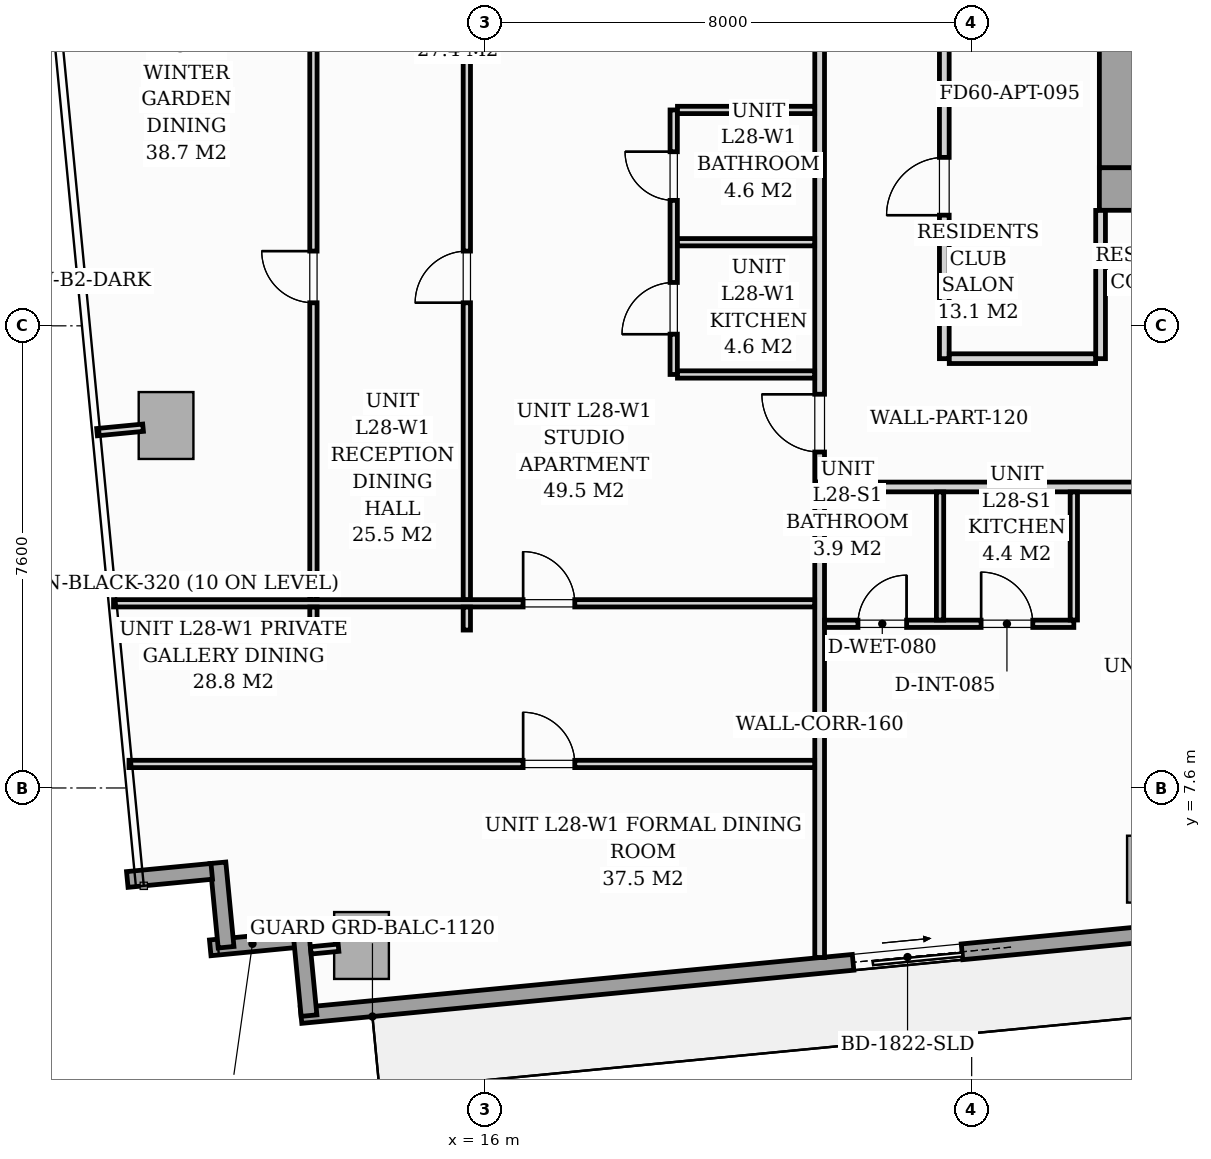
"""IFC4 building model, lengths in metres.
Left out: names, types, materials, properties, quantities, classifications, styles, units other than length and angle.
Written with IfcOpenShell. Run it as: python <this file> out.ifc"""

import sys

from ifc_helpers import new_model, si_unit, direction, frame, frame_2d, origin, origin_2d, place, context, subcontext, project, spatial, rectangle, i_section, extrude, source, transform, mapped, element, fill, save


model = new_model("IFC4")
c1 = context("Model", 3, precision=1e-05, world=origin(), true_north=direction((0.0, 1.0)))
c2 = subcontext(c1, "Body", "Model", "MODEL_VIEW")
j1 = project(units=[si_unit("LENGTHUNIT", "METRE"), si_unit("PLANEANGLEUNIT", "RADIAN")], contexts=[c1])
p1 = place(None, origin())
s1 = spatial("IfcSite", under=j1, at=p1, CompositionType="ELEMENT")
p2 = place(p1, origin())
s2 = spatial("IfcBuilding", under=s1, at=p2, CompositionType="ELEMENT")
p3 = place(p2, frame((0.0, 0.0, 100.2)))
s3 = spatial("IfcBuildingStorey", under=s2, at=p3, CompositionType="ELEMENT", Elevation=100.2)
m1 = source(origin(), c2, "Body", "SweptSolid", [
    extrude(i_section(OverallWidth=0.427, OverallDepth=0.483, WebThickness=0.051, FlangeThickness=0.082, FilletRadius=0.018, at=origin_2d()), origin(), (0.0, 0.0, 1.0), 3.196),
])
p4 = place(p3, frame((26.4, 17.4, 0.002), z_axis=(0.0, 0.0, 1.0), x_axis=(1.0, 0.0, 0.0)))
e1 = element("IfcColumn", 1, at=p4, inside=s3, PredefinedType="PILASTER", context=c2, shape_type="MappedRepresentation", body=[
    mapped(m1, transform((0.0, 0.0, 0.0), scale=1.0)),
])
m2 = source(origin(), c2, "Body", "SweptSolid", [
    extrude(rectangle(XDim=0.9, YDim=1.1, at=origin_2d()), origin(), (0.0, 0.0, 1.0), 3.196),
])
for number, where, z_axis, x_axis in (
    (2, (13.966, 5.01, 0.002), (0.0, 0.0, 1.0), (0.995, 0.096, 0.0)),
    (3, (27.006, 6.265, 0.002), (0.0, 0.0, 1.0), (0.995, 0.096, 0.0)),
    (4, (10.752, 13.561, 0.002), (0.0, 0.0, 1.0), (0.995, 0.096, 0.0)),
):
    element("IfcColumn", number, at=place(p3, frame(where, z_axis=z_axis, x_axis=x_axis)), inside=s3, PredefinedType="COLUMN", context=c2, shape_type="MappedRepresentation", body=[
        mapped(m2, transform((0.0, 0.0, 0.0), scale=1.0)),
    ])
for number, where, z_axis, x_axis in (
    (5, (12.867, 5.104, 0.0), (0.0, 0.0, 1.0), (-0.995, -0.096, 0.0)),
    (6, (11.739, 4.981, 0.0), (0.0, 0.0, 1.0), (-0.096, 0.995, 0.0)),
):
    element("IfcWall", number, at=place(p3, frame(where, z_axis=z_axis, x_axis=x_axis)), inside=s3, PredefinedType="STANDARD", context=c2, shape_type="SweptSolid", body=[
        extrude(rectangle(XDim=1.395, YDim=0.26, at=frame_2d((0.697, 0.0))), origin(), (0.0, 0.0, 1.0), 2.94),
    ])
p5 = place(p3, frame((11.503, 6.229, 0.0), z_axis=(0.0, 0.0, 1.0), x_axis=(-0.995391056452, -0.09589913835, 0.0)))
e7 = element("IfcWall", 7, at=p5, inside=s3, PredefinedType="STANDARD", context=c2, shape_type="SweptSolid", body=[
    extrude(rectangle(XDim=1.395, YDim=0.26, at=frame_2d((0.698, 0.0))), origin(), (0.0, 0.0, 1.0), 2.94),
])
p6 = place(p3, frame((31.994, 5.69, 0.0), z_axis=(0.0, 0.0, 1.0), x_axis=(-0.995396521236, -0.095842399342, 0.0)))
e8 = element("IfcWall", 8, at=p6, inside=s3, PredefinedType="STANDARD", context=c2, shape_type="SweptSolid", body=[
    extrude(rectangle(XDim=19.11, YDim=0.26, at=frame_2d((9.555, 0.0))), origin(), (0.0, 0.0, 1.0), 2.94),
])
p7 = place(p6, frame((8.19, 0.0, 0.0)))
e9 = element("IfcOpeningElement", 9, at=p7, cuts=e8, PredefinedType="OPENING", context=c2, shape_type="SweptSolid", body=[
    extrude(rectangle(XDim=1.8, YDim=2.06, at=frame_2d((0.9, 1.03))), frame((0.0, 0.14, 0.0), z_axis=(0.0, -1.0, 0.0), x_axis=(1.0, 0.0, 0.0)), (0.0, 0.0, 1.0), 0.28),
])
p8 = place(p6, frame((2.05, 0.0, 0.65)))
e10 = element("IfcOpeningElement", 10, at=p8, cuts=e8, PredefinedType="OPENING", context=c2, shape_type="SweptSolid", body=[
    extrude(rectangle(XDim=1.6, YDim=1.5, at=frame_2d((0.8, 0.75))), frame((0.0, 0.14, 0.0), z_axis=(0.0, -1.0, 0.0), x_axis=(1.0, 0.0, 0.0)), (0.0, 0.0, 1.0), 0.28),
])
p9 = place(p3, frame((13.103, 3.856, 0.0), z_axis=(0.0, 0.0, 1.0), x_axis=(-0.09589913835, 0.995391056452, 0.0)))
e11 = element("IfcWall", 11, at=p9, inside=s3, PredefinedType="STANDARD", context=c2, shape_type="SweptSolid", body=[
    extrude(rectangle(XDim=1.395, YDim=0.26, at=frame_2d((0.698, 0.0))), origin(), (0.0, 0.0, 1.0), 2.94),
])
p10 = place(p3, frame((26.1, 17.45, 0.0), z_axis=(0.0, 0.0, 1.0), x_axis=(1.0, 0.0, 0.0)))
e12 = element("IfcWall", 12, at=p10, inside=s3, PredefinedType="SHEAR", context=c2, shape_type="SweptSolid", body=[
    extrude(rectangle(XDim=19.8, YDim=0.7, at=frame_2d((9.9, 0.0))), origin(), (0.0, 0.0, 1.0), 3.2),
])
p11 = place(p10, frame((1.05, 0.0, 0.0)))
e13 = element("IfcOpeningElement", 13, at=p11, cuts=e12, PredefinedType="OPENING", context=c2, shape_type="SweptSolid", body=[
    extrude(rectangle(XDim=0.95, YDim=2.06, at=frame_2d((0.475, 1.03))), frame((0.0, 0.36, 0.0), z_axis=(0.0, -1.0, 0.0), x_axis=(1.0, 0.0, 0.0)), (0.0, 0.0, 1.0), 0.72),
])
p12 = place(p10, frame((9.48, 0.0, 0.0)))
e14 = element("IfcOpeningElement", 14, at=p12, cuts=e12, PredefinedType="OPENING", context=c2, shape_type="SweptSolid", body=[
    extrude(rectangle(XDim=0.85, YDim=2.0, at=frame_2d((0.425, 1.0))), frame((0.0, 0.36, 0.0), z_axis=(0.0, -1.0, 0.0), x_axis=(1.0, 0.0, 0.0)), (0.0, 0.0, 1.0), 0.72),
])
p13 = place(p10, frame((17.65, 0.0, 0.0)))
e15 = element("IfcOpeningElement", 15, at=p13, cuts=e12, PredefinedType="OPENING", context=c2, shape_type="SweptSolid", body=[
    extrude(rectangle(XDim=0.95, YDim=2.06, at=frame_2d((0.475, 1.03))), frame((0.0, 0.36, 0.0), z_axis=(0.0, -1.0, 0.0), x_axis=(1.0, 0.0, 0.0)), (0.0, 0.0, 1.0), 0.72),
])
p14 = place(p3, frame((26.45, 17.802, 0.0), z_axis=(0.0, 0.0, 1.0), x_axis=(0.0, 1.0, 0.0)))
e16 = element("IfcWall", 16, at=p14, inside=s3, PredefinedType="SHEAR", context=c2, shape_type="SweptSolid", body=[
    extrude(rectangle(XDim=5.796, YDim=0.7, at=frame_2d((2.898, 0.0))), origin(), (0.0, 0.0, 1.0), 3.2),
])
p15 = place(p3, frame((21.5, 12.55, 0.0), z_axis=(0.0, 0.0, 1.0), x_axis=(1.0, 0.0, 0.0)))
e17 = element("IfcWall", 17, at=p15, inside=s3, PredefinedType="PARTITIONING", context=c2, shape_type="SweptSolid", body=[
    extrude(rectangle(XDim=24.38, YDim=0.16, at=frame_2d((12.19, 0.0))), origin(), (0.0, 0.0, 1.0), 2.94),
])
p16 = place(p15, frame((6.075, 0.0, 0.0)))
e18 = element("IfcOpeningElement", 18, at=p16, cuts=e17, PredefinedType="OPENING", context=c2, shape_type="SweptSolid", body=[
    extrude(rectangle(XDim=0.95, YDim=2.06, at=frame_2d((0.475, 1.03))), frame((0.0, 0.09, 0.0), z_axis=(0.0, -1.0, 0.0), x_axis=(1.0, 0.0, 0.0)), (0.0, 0.0, 1.0), 0.18),
])
p17 = place(p15, frame((10.519, 0.0, 0.0)))
e19 = element("IfcOpeningElement", 19, at=p17, cuts=e17, PredefinedType="OPENING", context=c2, shape_type="SweptSolid", body=[
    extrude(rectangle(XDim=0.95, YDim=2.06, at=frame_2d((0.475, 1.03))), frame((0.0, 0.09, 0.0), z_axis=(0.0, -1.0, 0.0), x_axis=(1.0, 0.0, 0.0)), (0.0, 0.0, 1.0), 0.18),
])
p18 = place(p15, frame((18.208, 0.0, 0.0)))
e20 = element("IfcOpeningElement", 20, at=p18, cuts=e17, PredefinedType="OPENING", context=c2, shape_type="SweptSolid", body=[
    extrude(rectangle(XDim=0.95, YDim=2.06, at=frame_2d((0.475, 1.03))), frame((0.0, 0.09, 0.0), z_axis=(0.0, -1.0, 0.0), x_axis=(1.0, 0.0, 0.0)), (0.0, 0.0, 1.0), 0.18),
])
p19 = place(p3, frame((21.5, 4.812, 0.0), z_axis=(0.0, 0.0, 1.0), x_axis=(0.0, 1.0, 0.0)))
e21 = element("IfcWall", 21, at=p19, inside=s3, PredefinedType="PARTITIONING", context=c2, shape_type="SweptSolid", body=[
    extrude(rectangle(XDim=7.656, YDim=0.16, at=frame_2d((3.828, 0.0))), origin(), (0.0, 0.0, 1.0), 2.94),
])
p20 = place(p3, frame((21.5, 12.632, 0.0), z_axis=(0.0, 0.0, 1.0), x_axis=(0.0, 1.0, 0.0)))
e22 = element("IfcWall", 22, at=p20, inside=s3, PredefinedType="PARTITIONING", context=c2, shape_type="SweptSolid", body=[
    extrude(rectangle(XDim=11.747, YDim=0.16, at=frame_2d((5.873, 0.0))), origin(), (0.0, 0.0, 1.0), 2.94),
])
p21 = place(p20, frame((0.493, 0.0, 0.0)))
e23 = element("IfcOpeningElement", 23, at=p21, cuts=e22, PredefinedType="OPENING", context=c2, shape_type="SweptSolid", body=[
    extrude(rectangle(XDim=0.95, YDim=2.06, at=frame_2d((0.475, 1.03))), frame((0.0, 0.09, 0.0), z_axis=(0.0, -1.0, 0.0), x_axis=(1.0, 0.0, 0.0)), (0.0, 0.0, 1.0), 0.18),
])
p22 = place(p3, frame((21.582, 10.3, 0.0), z_axis=(0.0, 0.0, 1.0), x_axis=(1.0, 0.0, 0.0)))
e24 = element("IfcWall", 24, at=p22, inside=s3, PredefinedType="PARTITIONING", context=c2, shape_type="SweptSolid", body=[
    extrude(rectangle(XDim=4.098, YDim=0.12, at=frame_2d((2.049, 0.0))), origin(), (0.0, 0.0, 1.0), 2.94),
])
p23 = place(p22, frame((0.548, 0.0, 0.0)))
e25 = element("IfcOpeningElement", 25, at=p23, cuts=e24, PredefinedType="OPENING", context=c2, shape_type="SweptSolid", body=[
    extrude(rectangle(XDim=0.8, YDim=2.02, at=frame_2d((0.4, 1.01))), frame((0.0, 0.07, 0.0), z_axis=(0.0, -1.0, 0.0), x_axis=(1.0, 0.0, 0.0)), (0.0, 0.0, 1.0), 0.14),
])
p24 = place(p22, frame((2.573, 0.0, 0.0)))
e26 = element("IfcOpeningElement", 26, at=p24, cuts=e24, PredefinedType="OPENING", context=c2, shape_type="SweptSolid", body=[
    extrude(rectangle(XDim=0.85, YDim=2.05, at=frame_2d((0.425, 1.025))), frame((0.0, 0.07, 0.0), z_axis=(0.0, -1.0, 0.0), x_axis=(1.0, 0.0, 0.0)), (0.0, 0.0, 1.0), 0.14),
])
for number, where, z_axis, x_axis in (
    (27, (25.68, 10.362, 0.0), (0.0, 0.0, 1.0), (0.0, 1.0, 0.0)),
    (28, (23.48, 10.362, 0.0), (0.0, 0.0, 1.0), (0.0, 1.0, 0.0)),
):
    element("IfcWall", number, at=place(p3, frame(where, z_axis=z_axis, x_axis=x_axis)), inside=s3, PredefinedType="PARTITIONING", context=c2, shape_type="SweptSolid", body=[
        extrude(rectangle(XDim=2.106, YDim=0.12, at=frame_2d((1.053, 0.0))), origin(), (0.0, 0.0, 1.0), 2.94),
    ])
p25 = place(p3, frame((19.1, 14.4, 0.0), z_axis=(0.0, 0.0, 1.0), x_axis=(0.0, 1.0, 0.0)))
e29 = element("IfcWall", 29, at=p25, inside=s3, PredefinedType="PARTITIONING", context=c2, shape_type="SweptSolid", body=[
    extrude(rectangle(XDim=4.35, YDim=0.12, at=frame_2d((2.175, 0.0))), origin(), (0.0, 0.0, 1.0), 2.94),
])
p26 = place(p25, frame((0.663, 0.0, 0.0)))
e30 = element("IfcOpeningElement", 30, at=p26, cuts=e29, PredefinedType="OPENING", context=c2, shape_type="SweptSolid", body=[
    extrude(rectangle(XDim=0.85, YDim=2.05, at=frame_2d((0.425, 1.025))), frame((0.0, 0.07, 0.0), z_axis=(0.0, -1.0, 0.0), x_axis=(1.0, 0.0, 0.0)), (0.0, 0.0, 1.0), 0.14),
])
p27 = place(p25, frame((2.863, 0.0, 0.0)))
e31 = element("IfcOpeningElement", 31, at=p27, cuts=e29, PredefinedType="OPENING", context=c2, shape_type="SweptSolid", body=[
    extrude(rectangle(XDim=0.8, YDim=2.02, at=frame_2d((0.4, 1.01))), frame((0.0, 0.07, 0.0), z_axis=(0.0, -1.0, 0.0), x_axis=(1.0, 0.0, 0.0)), (0.0, 0.0, 1.0), 0.14),
])
for number, where, z_axis, x_axis in (
    (32, (19.162, 16.575, 0.0), (0.0, 0.0, 1.0), (1.0, 0.0, 0.0)),
    (33, (19.162, 14.4, 0.0), (0.0, 0.0, 1.0), (1.0, 0.0, 0.0)),
    (34, (19.162, 18.75, 0.0), (0.0, 0.0, 1.0), (1.0, 0.0, 0.0)),
):
    element("IfcWall", number, at=place(p3, frame(where, z_axis=z_axis, x_axis=x_axis)), inside=s3, PredefinedType="PARTITIONING", context=c2, shape_type="SweptSolid", body=[
        extrude(rectangle(XDim=2.256, YDim=0.12, at=frame_2d((1.128, 0.0))), origin(), (0.0, 0.0, 1.0), 2.94),
    ])
p28 = place(p3, frame((10.142, 7.995, 0.0), z_axis=(0.0, 0.0, 1.0), x_axis=(1.0, 0.0, 0.0)))
e35 = element("IfcWall", 35, at=p28, inside=s3, PredefinedType="PARTITIONING", context=c2, shape_type="SweptSolid", body=[
    extrude(rectangle(XDim=11.276, YDim=0.12, at=frame_2d((5.638, 0.0))), origin(), (0.0, 0.0, 1.0), 2.94),
])
p29 = place(p28, frame((6.481, 0.0, 0.0)))
e36 = element("IfcOpeningElement", 36, at=p29, cuts=e35, PredefinedType="OPENING", context=c2, shape_type="SweptSolid", body=[
    extrude(rectangle(XDim=0.85, YDim=2.05, at=frame_2d((0.425, 1.025))), frame((0.0, 0.07, 0.0), z_axis=(0.0, -1.0, 0.0), x_axis=(1.0, 0.0, 0.0)), (0.0, 0.0, 1.0), 0.14),
])
p30 = place(p3, frame((9.888, 10.637, 0.0), z_axis=(0.0, 0.0, 1.0), x_axis=(1.0, 0.0, 0.0)))
e37 = element("IfcWall", 37, at=p30, inside=s3, PredefinedType="PARTITIONING", context=c2, shape_type="SweptSolid", body=[
    extrude(rectangle(XDim=11.53, YDim=0.12, at=frame_2d((5.765, 0.0))), origin(), (0.0, 0.0, 1.0), 2.94),
])
p31 = place(p30, frame((6.735, 0.0, 0.0)))
e38 = element("IfcOpeningElement", 38, at=p31, cuts=e37, PredefinedType="OPENING", context=c2, shape_type="SweptSolid", body=[
    extrude(rectangle(XDim=0.85, YDim=2.05, at=frame_2d((0.425, 1.025))), frame((0.0, 0.07, 0.0), z_axis=(0.0, -1.0, 0.0), x_axis=(1.0, 0.0, 0.0)), (0.0, 0.0, 1.0), 0.14),
])
p32 = place(p3, frame((13.175, 10.197, 0.0), z_axis=(0.0, 0.0, 1.0), x_axis=(0.0, 1.0, 0.0)))
e39 = element("IfcWall", 39, at=p32, inside=s3, PredefinedType="PARTITIONING", context=c2, shape_type="SweptSolid", body=[
    extrude(rectangle(XDim=0.378, YDim=0.12, at=frame_2d((0.189, 0.0))), origin(), (0.0, 0.0, 1.0), 2.94),
])
p33 = place(p3, frame((13.175, 10.699, 0.0), z_axis=(0.0, 0.0, 1.0), x_axis=(0.0, 1.0, 0.0)))
e40 = element("IfcWall", 40, at=p33, inside=s3, PredefinedType="PARTITIONING", context=c2, shape_type="SweptSolid", body=[
    extrude(rectangle(XDim=10.61, YDim=0.12, at=frame_2d((5.305, 0.0))), origin(), (0.0, 0.0, 1.0), 2.94),
])
p34 = place(p33, frame((4.88, 0.0, 0.0)))
e41 = element("IfcOpeningElement", 41, at=p34, cuts=e40, PredefinedType="OPENING", context=c2, shape_type="SweptSolid", body=[
    extrude(rectangle(XDim=0.85, YDim=2.05, at=frame_2d((0.425, 1.025))), frame((0.0, 0.07, 0.0), z_axis=(0.0, -1.0, 0.0), x_axis=(1.0, 0.0, 0.0)), (0.0, 0.0, 1.0), 0.14),
])
p35 = place(p3, frame((15.698, 10.197, 0.0), z_axis=(0.0, 0.0, 1.0), x_axis=(0.0, 1.0, 0.0)))
e42 = element("IfcWall", 42, at=p35, inside=s3, PredefinedType="PARTITIONING", context=c2, shape_type="SweptSolid", body=[
    extrude(rectangle(XDim=0.378, YDim=0.12, at=frame_2d((0.189, 0.0))), origin(), (0.0, 0.0, 1.0), 2.94),
])
p36 = place(p3, frame((15.698, 10.699, 0.0), z_axis=(0.0, 0.0, 1.0), x_axis=(0.0, 1.0, 0.0)))
e43 = element("IfcWall", 43, at=p36, inside=s3, PredefinedType="PARTITIONING", context=c2, shape_type="SweptSolid", body=[
    extrude(rectangle(XDim=10.61, YDim=0.12, at=frame_2d((5.305, 0.0))), origin(), (0.0, 0.0, 1.0), 2.94),
])
p37 = place(p36, frame((4.88, 0.0, 0.0)))
e44 = element("IfcOpeningElement", 44, at=p37, cuts=e43, PredefinedType="OPENING", context=c2, shape_type="SweptSolid", body=[
    extrude(rectangle(XDim=0.85, YDim=2.05, at=frame_2d((0.425, 1.025))), frame((0.0, 0.07, 0.0), z_axis=(0.0, -1.0, 0.0), x_axis=(1.0, 0.0, 0.0)), (0.0, 0.0, 1.0), 0.14),
])
p38 = place(p3, frame((23.55, 14.66, 0.0), z_axis=(0.0, 0.0, 1.0), x_axis=(0.0, 1.0, 0.0)))
e45 = element("IfcWall", 45, at=p38, inside=s3, PredefinedType="PARTITIONING", context=c2, shape_type="SweptSolid", body=[
    extrude(rectangle(XDim=5.59, YDim=0.16, at=frame_2d((2.795, 0.0))), origin(), (0.0, 0.0, 1.0), 2.94),
])
p39 = place(p38, frame((2.36, 0.0, 0.0)))
e46 = element("IfcOpeningElement", 46, at=p39, cuts=e45, PredefinedType="OPENING", context=c2, shape_type="SweptSolid", body=[
    extrude(rectangle(XDim=0.95, YDim=2.06, at=frame_2d((0.475, 1.03))), frame((0.0, 0.09, 0.0), z_axis=(0.0, -1.0, 0.0), x_axis=(1.0, 0.0, 0.0)), (0.0, 0.0, 1.0), 0.18),
])
p40 = place(p3, frame((26.12, 14.66, 0.0), z_axis=(0.0, 0.0, 1.0), x_axis=(0.0, 1.0, 0.0)))
e47 = element("IfcWall", 47, at=p40, inside=s3, PredefinedType="PARTITIONING", context=c2, shape_type="SweptSolid", body=[
    extrude(rectangle(XDim=2.438, YDim=0.16, at=frame_2d((1.219, 0.0))), origin(), (0.0, 0.0, 1.0), 2.94),
])
p41 = place(p3, frame((23.632, 14.66, 0.0), z_axis=(0.0, 0.0, 1.0), x_axis=(1.0, 0.0, 0.0)))
e48 = element("IfcWall", 48, at=p41, inside=s3, PredefinedType="PARTITIONING", context=c2, shape_type="SweptSolid", body=[
    extrude(rectangle(XDim=2.406, YDim=0.16, at=frame_2d((1.203, 0.0))), origin(), (0.0, 0.0, 1.0), 2.94),
])
p42 = place(p3, frame((13.588, 4.973, 0.0), z_axis=(0.0, 0.0, 1.0), x_axis=(-0.995435366701, -0.095438098896, 0.0)))
e49 = element("IfcWall", 49, at=p42, inside=s3, PredefinedType="PARTITIONING", context=c2, shape_type="SweptSolid", body=[
    extrude(rectangle(XDim=0.458, YDim=0.12, at=frame_2d((0.229, 0.0))), origin(), (0.0, 0.0, 1.0), 2.94),
])
p43 = place(p3, frame((10.373, 13.524, 0.0), z_axis=(0.0, 0.0, 1.0), x_axis=(-0.995377786728, -0.096036772582, 0.0)))
e50 = element("IfcWall", 50, at=p43, inside=s3, PredefinedType="PARTITIONING", context=c2, shape_type="SweptSolid", body=[
    extrude(rectangle(XDim=0.76, YDim=0.12, at=frame_2d((0.38, 0.0))), origin(), (0.0, 0.0, 1.0), 2.94),
])
m3 = source(origin(), c2, "Body", "SweptSolid", [
    extrude(rectangle(XDim=1.8, YDim=2.06, at=frame_2d((0.9, 1.03))), frame((0.0, 0.025, 0.0), z_axis=(0.0, -1.0, 0.0), x_axis=(1.0, 0.0, 0.0)), (0.0, 0.0, 1.0), 0.05),
])
p44 = place(p7, origin())
e51 = element("IfcDoor", 51, at=p44, inside=s3, OperationType="SLIDING_TO_LEFT", PredefinedType="DOOR", context=c2, shape_type="MappedRepresentation", body=[
    mapped(m3, transform((0.0, 0.0, 0.0), scale=1.0)),
])
fill(e9, e51)
m4 = source(origin(), c2, "Body", "SweptSolid", [
    extrude(rectangle(XDim=0.8, YDim=2.02, at=frame_2d((0.4, 1.01))), frame((0.0, 0.025, 0.0), z_axis=(0.0, -1.0, 0.0), x_axis=(1.0, 0.0, 0.0)), (0.0, 0.0, 1.0), 0.05),
])
p45 = place(p23, origin())
e52 = element("IfcDoor", 52, at=p45, inside=s3, OperationType="SINGLE_SWING_RIGHT", PredefinedType="DOOR", context=c2, shape_type="MappedRepresentation", body=[
    mapped(m4, transform((0.0, 0.0, 0.0), scale=1.0)),
])
fill(e25, e52)
m5 = source(origin(), c2, "Body", "SweptSolid", [
    extrude(rectangle(XDim=0.85, YDim=2.05, at=frame_2d((0.425, 1.025))), frame((0.0, 0.025, 0.0), z_axis=(0.0, -1.0, 0.0), x_axis=(1.0, 0.0, 0.0)), (0.0, 0.0, 1.0), 0.05),
])
p46 = place(p24, origin())
e53 = element("IfcDoor", 53, at=p46, inside=s3, OperationType="SINGLE_SWING_LEFT", PredefinedType="DOOR", context=c2, shape_type="MappedRepresentation", body=[
    mapped(m5, transform((0.0, 0.0, 0.0), scale=1.0)),
])
fill(e26, e53)
m6 = source(origin(), c2, "Body", "SweptSolid", [
    extrude(rectangle(XDim=0.95, YDim=2.06, at=frame_2d((0.475, 1.03))), frame((0.0, 0.025, 0.0), z_axis=(0.0, -1.0, 0.0), x_axis=(1.0, 0.0, 0.0)), (0.0, 0.0, 1.0), 0.05),
])
p47 = place(p21, origin())
e54 = element("IfcDoor", 54, at=p47, inside=s3, OperationType="SINGLE_SWING_RIGHT", PredefinedType="DOOR", context=c2, shape_type="MappedRepresentation", body=[
    mapped(m6, transform((0.0, 0.0, 0.0), scale=1.0)),
])
fill(e23, e54)
p48 = place(p26, origin())
e55 = element("IfcDoor", 55, at=p48, inside=s3, OperationType="SINGLE_SWING_LEFT", PredefinedType="DOOR", context=c2, shape_type="MappedRepresentation", body=[
    mapped(m5, transform((0.0, 0.0, 0.0), scale=1.0)),
])
fill(e30, e55)
p49 = place(p27, origin())
e56 = element("IfcDoor", 56, at=p49, inside=s3, OperationType="SINGLE_SWING_RIGHT", PredefinedType="DOOR", context=c2, shape_type="MappedRepresentation", body=[
    mapped(m4, transform((0.0, 0.0, 0.0), scale=1.0)),
])
fill(e31, e56)
p50 = place(p29, origin())
e57 = element("IfcDoor", 57, at=p50, inside=s3, OperationType="SINGLE_SWING_LEFT", PredefinedType="DOOR", context=c2, shape_type="MappedRepresentation", body=[
    mapped(m5, transform((0.0, 0.0, 0.0), scale=1.0)),
])
fill(e36, e57)
p51 = place(p31, origin())
e58 = element("IfcDoor", 58, at=p51, inside=s3, OperationType="SINGLE_SWING_LEFT", PredefinedType="DOOR", context=c2, shape_type="MappedRepresentation", body=[
    mapped(m5, transform((0.0, 0.0, 0.0), scale=1.0)),
])
fill(e38, e58)
p52 = place(p34, origin())
e59 = element("IfcDoor", 59, at=p52, inside=s3, OperationType="SINGLE_SWING_RIGHT", PredefinedType="DOOR", context=c2, shape_type="MappedRepresentation", body=[
    mapped(m5, transform((0.0, 0.0, 0.0), scale=1.0)),
])
fill(e41, e59)
p53 = place(p37, origin())
e60 = element("IfcDoor", 60, at=p53, inside=s3, OperationType="SINGLE_SWING_LEFT", PredefinedType="DOOR", context=c2, shape_type="MappedRepresentation", body=[
    mapped(m5, transform((0.0, 0.0, 0.0), scale=1.0)),
])
fill(e44, e60)
p54 = place(p39, origin())
e61 = element("IfcDoor", 61, at=p54, inside=s3, OperationType="SINGLE_SWING_LEFT", PredefinedType="DOOR", context=c2, shape_type="MappedRepresentation", body=[
    mapped(m6, transform((0.0, 0.0, 0.0), scale=1.0)),
])
fill(e46, e61)
save(model, sys.argv[1])
